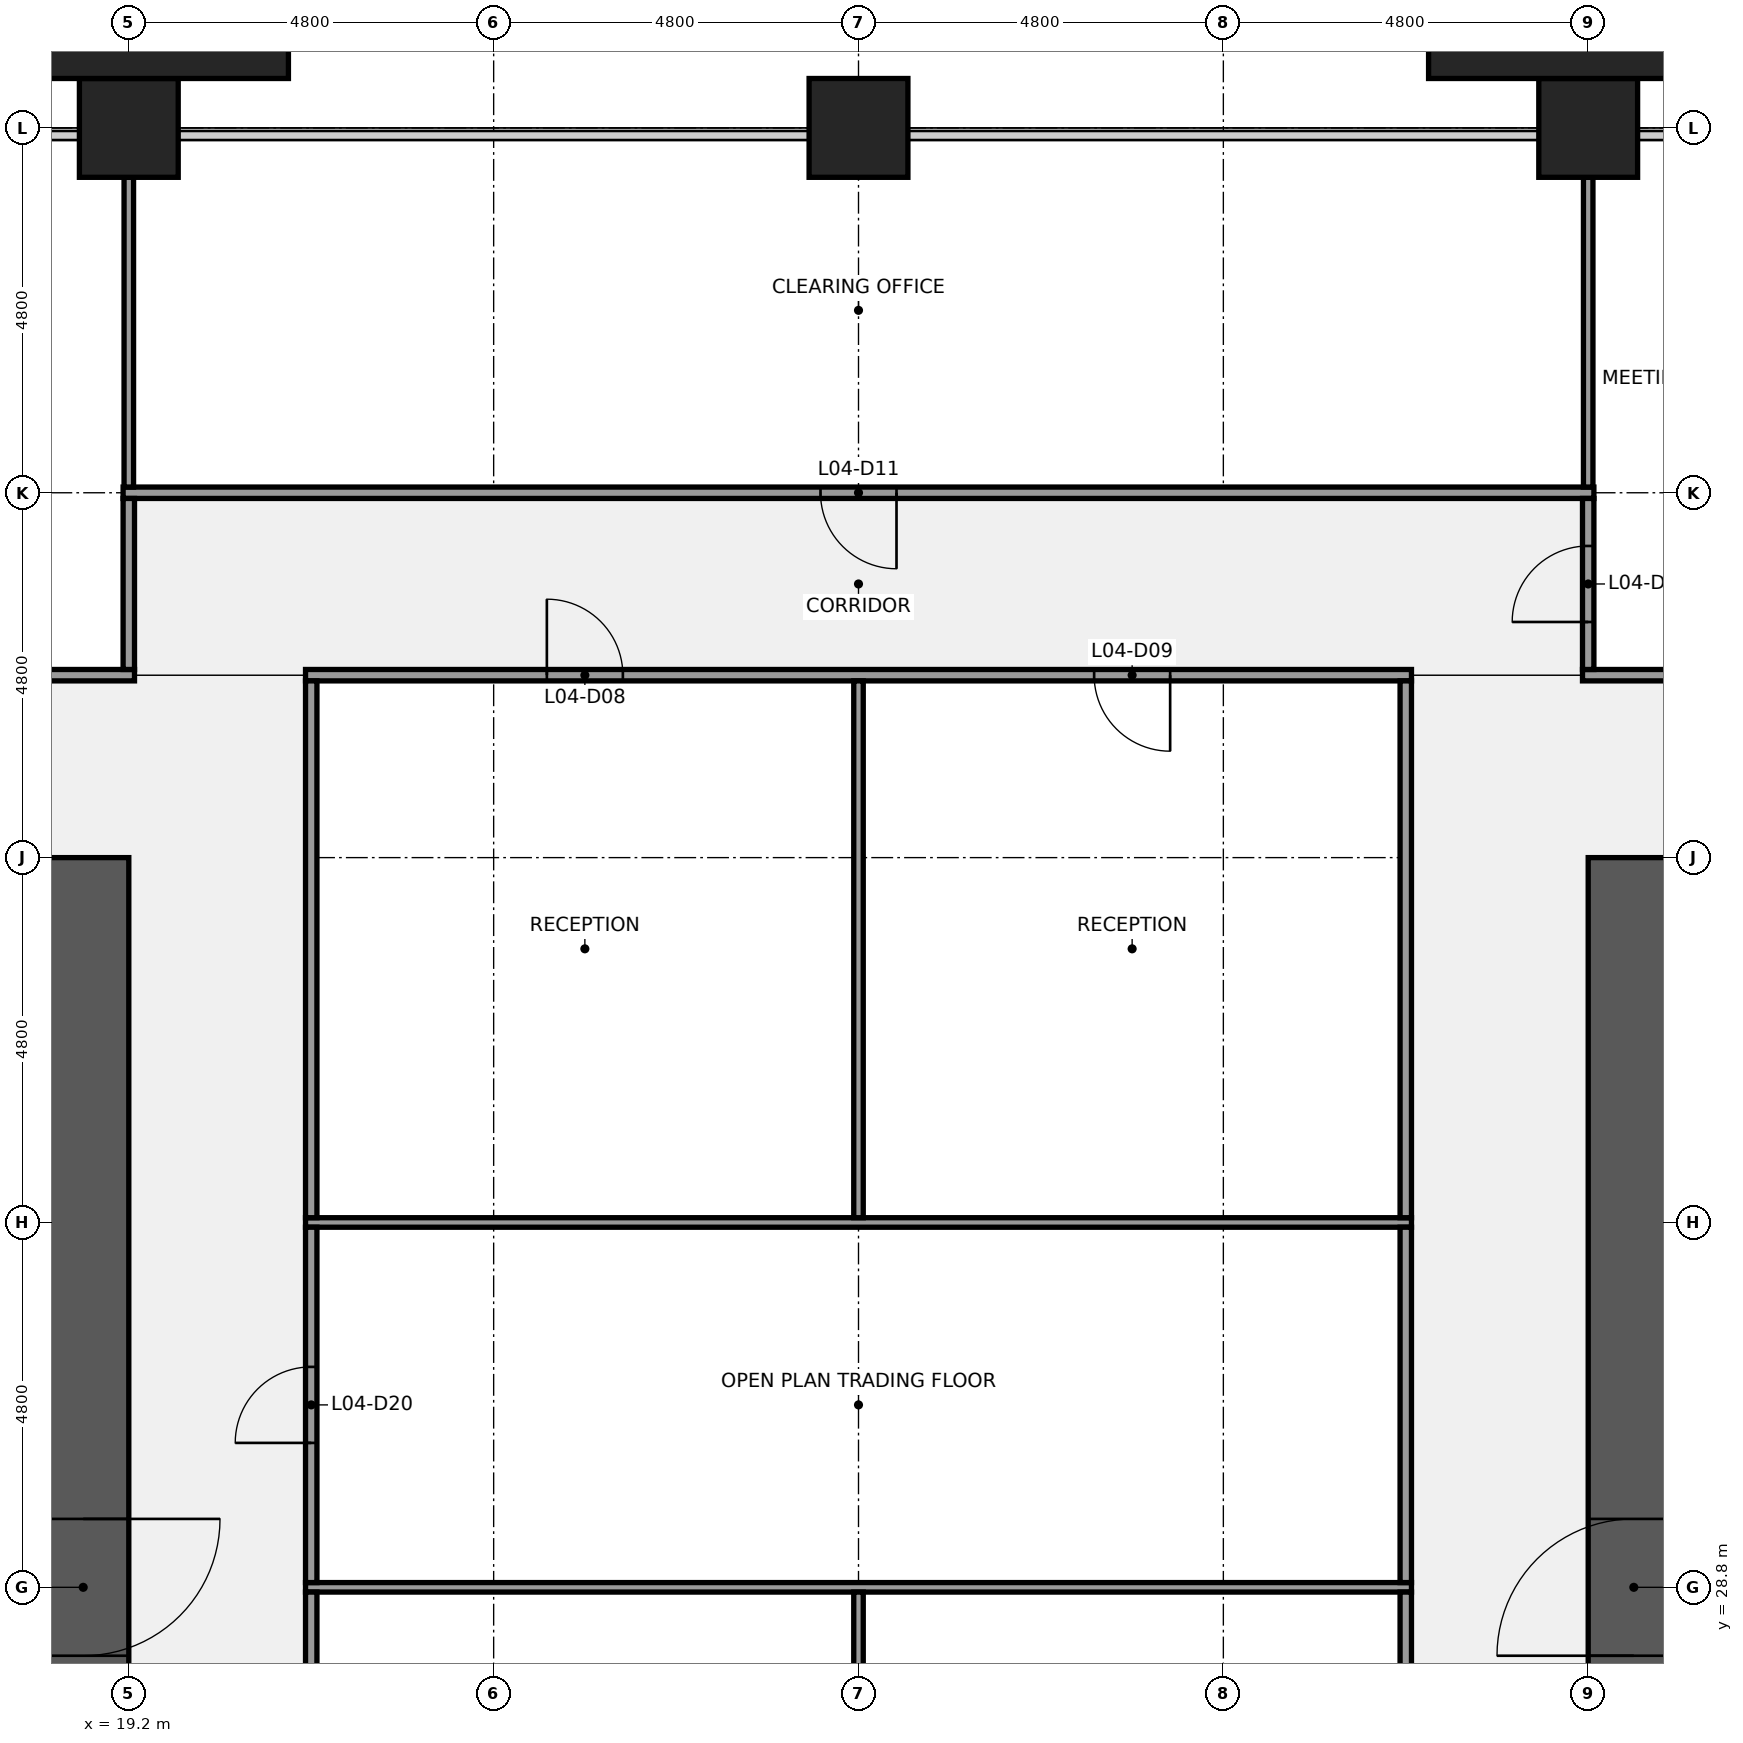
"""IFC4 building model, lengths in metres.
Left out: names, types, materials, properties, quantities, classifications, styles, units other than length and angle.
Written with IfcOpenShell. Run it as: python <this file> out.ifc"""

import sys

from ifc_helpers import new_model, si_unit, direction, frame, frame_2d, origin, origin_2d, place, context, subcontext, project, spatial, rectangle, extrude, element, fill, save


model = new_model("IFC4")
c1 = context("Model", 3, precision=1e-05, world=origin(), true_north=direction((0.0, 1.0)))
c2 = subcontext(c1, "Body", "Model", "MODEL_VIEW")
j1 = project(units=[si_unit("LENGTHUNIT", "METRE"), si_unit("PLANEANGLEUNIT", "RADIAN")], contexts=[c1])
p1 = place(None, origin())
s1 = spatial("IfcSite", under=j1, at=p1, CompositionType="ELEMENT")
p2 = place(p1, origin())
s2 = spatial("IfcBuilding", under=s1, at=p2, CompositionType="ELEMENT")
p3 = place(p2, frame((0.0, 0.0, 25.8)))
s3 = spatial("IfcBuildingStorey", under=s2, at=p3, CompositionType="ELEMENT", Elevation=25.8)
for number, where, z_axis, x_axis in (
    (1, (19.2, 48.0, 0.0), (0.0, 0.0, 1.0), (1.0, 0.0, 0.0)),
    (2, (28.8, 48.0, 0.0), (0.0, 0.0, 1.0), (1.0, 0.0, 0.0)),
    (3, (38.4, 48.0, 0.0), (0.0, 0.0, 1.0), (1.0, 0.0, 0.0)),
):
    element("IfcColumn", number, at=place(p3, frame(where, z_axis=z_axis, x_axis=x_axis)), inside=s3, PredefinedType="COLUMN", context=c2, shape_type="SweptSolid", body=[
        extrude(rectangle(XDim=1.3, YDim=1.3, at=origin_2d()), origin(), (0.0, 0.0, 1.0), 4.4),
    ])
p4 = place(p3, frame((18.6, 38.4, 0.0), z_axis=(0.0, 0.0, 1.0), x_axis=(0.0, -1.0, 0.0)))
e4 = element("IfcWall", 4, at=p4, inside=s3, PredefinedType="SHEAR", context=c2, shape_type="SweptSolid", body=[
    extrude(rectangle(XDim=28.8, YDim=1.2, at=frame_2d((14.4, 0.0))), origin(), (0.0, 0.0, 1.0), 4.24),
])
p5 = place(p4, frame((18.3, 0.0, 0.0)))
e5 = element("IfcOpeningElement", 5, at=p5, cuts=e4, PredefinedType="OPENING", context=c2, shape_type="SweptSolid", body=[
    extrude(rectangle(XDim=1.8, YDim=2.1, at=frame_2d((0.9, 1.05))), frame((0.0, 0.61, 0.0), z_axis=(0.0, -1.0, 0.0), x_axis=(1.0, 0.0, 0.0)), (0.0, 0.0, 1.0), 1.22),
])
p6 = place(p4, frame((8.7, 0.0, 0.0)))
e6 = element("IfcOpeningElement", 6, at=p6, cuts=e4, PredefinedType="OPENING", context=c2, shape_type="SweptSolid", body=[
    extrude(rectangle(XDim=1.8, YDim=2.1, at=frame_2d((0.9, 1.05))), frame((0.0, 0.61, 0.0), z_axis=(0.0, -1.0, 0.0), x_axis=(1.0, 0.0, 0.0)), (0.0, 0.0, 1.0), 1.22),
])
p7 = place(p3, frame((39.0, 9.6, 0.0), z_axis=(0.0, 0.0, 1.0), x_axis=(0.0, 1.0, 0.0)))
e7 = element("IfcWall", 7, at=p7, inside=s3, PredefinedType="SHEAR", context=c2, shape_type="SweptSolid", body=[
    extrude(rectangle(XDim=28.8, YDim=1.2, at=frame_2d((14.4, 0.0))), origin(), (0.0, 0.0, 1.0), 4.24),
])
p8 = place(p7, frame((8.7, 0.0, 0.0)))
e8 = element("IfcOpeningElement", 8, at=p8, cuts=e7, PredefinedType="OPENING", context=c2, shape_type="SweptSolid", body=[
    extrude(rectangle(XDim=1.8, YDim=2.1, at=frame_2d((0.9, 1.05))), frame((0.0, 0.61, 0.0), z_axis=(0.0, -1.0, 0.0), x_axis=(1.0, 0.0, 0.0)), (0.0, 0.0, 1.0), 1.22),
])
p9 = place(p7, frame((18.3, 0.0, 0.0)))
e9 = element("IfcOpeningElement", 9, at=p9, cuts=e7, PredefinedType="OPENING", context=c2, shape_type="SweptSolid", body=[
    extrude(rectangle(XDim=1.8, YDim=2.1, at=frame_2d((0.9, 1.05))), frame((0.0, 0.61, 0.0), z_axis=(0.0, -1.0, 0.0), x_axis=(1.0, 0.0, 0.0)), (0.0, 0.0, 1.0), 1.22),
])
for number, where, z_axis, x_axis in (
    (10, (21.525, 28.8, 0.0), (0.0, 0.0, 1.0), (1.0, 0.0, 0.0)),
    (11, (21.525, 33.6, 0.0), (0.0, 0.0, 1.0), (1.0, 0.0, 0.0)),
):
    element("IfcWall", number, at=place(p3, frame(where, z_axis=z_axis, x_axis=x_axis)), inside=s3, PredefinedType="PARTITIONING", context=c2, shape_type="SweptSolid", body=[
        extrude(rectangle(XDim=14.55, YDim=0.125, at=frame_2d((7.275, 0.0))), origin(), (0.0, 0.0, 1.0), 3.27),
    ])
p10 = place(p3, frame((14.325, 40.8, 0.0), z_axis=(0.0, 0.0, 1.0), x_axis=(1.0, 0.0, 0.0)))
e12 = element("IfcWall", 12, at=p10, inside=s3, PredefinedType="PARTITIONING", context=c2, shape_type="SweptSolid", body=[
    extrude(rectangle(XDim=4.95, YDim=0.15, at=frame_2d((2.475, 0.0))), origin(), (0.0, 0.0, 1.0), 3.27),
])
p11 = place(p10, frame((1.975, 0.0, 0.0)))
e13 = element("IfcOpeningElement", 13, at=p11, cuts=e12, PredefinedType="OPENING", context=c2, shape_type="SweptSolid", body=[
    extrude(rectangle(XDim=1.0, YDim=2.1, at=frame_2d((0.5, 1.05))), frame((0.0, 0.085, 0.0), z_axis=(0.0, -1.0, 0.0), x_axis=(1.0, 0.0, 0.0)), (0.0, 0.0, 1.0), 0.17),
])
p12 = place(p3, frame((21.525, 40.8, 0.0), z_axis=(0.0, 0.0, 1.0), x_axis=(1.0, 0.0, 0.0)))
e14 = element("IfcWall", 14, at=p12, inside=s3, PredefinedType="PARTITIONING", context=c2, shape_type="SweptSolid", body=[
    extrude(rectangle(XDim=14.55, YDim=0.15, at=frame_2d((7.275, 0.0))), origin(), (0.0, 0.0, 1.0), 3.27),
])
p13 = place(p12, frame((3.175, 0.0, 0.0)))
e15 = element("IfcOpeningElement", 15, at=p13, cuts=e14, PredefinedType="OPENING", context=c2, shape_type="SweptSolid", body=[
    extrude(rectangle(XDim=1.0, YDim=2.1, at=frame_2d((0.5, 1.05))), frame((0.0, 0.085, 0.0), z_axis=(0.0, -1.0, 0.0), x_axis=(1.0, 0.0, 0.0)), (0.0, 0.0, 1.0), 0.17),
])
p14 = place(p12, frame((10.375, 0.0, 0.0)))
e16 = element("IfcOpeningElement", 16, at=p14, cuts=e14, PredefinedType="OPENING", context=c2, shape_type="SweptSolid", body=[
    extrude(rectangle(XDim=1.0, YDim=2.1, at=frame_2d((0.5, 1.05))), frame((0.0, 0.085, 0.0), z_axis=(0.0, -1.0, 0.0), x_axis=(1.0, 0.0, 0.0)), (0.0, 0.0, 1.0), 0.17),
])
p15 = place(p3, frame((38.325, 40.8, 0.0), z_axis=(0.0, 0.0, 1.0), x_axis=(1.0, 0.0, 0.0)))
e17 = element("IfcWall", 17, at=p15, inside=s3, PredefinedType="PARTITIONING", context=c2, shape_type="SweptSolid", body=[
    extrude(rectangle(XDim=9.75, YDim=0.15, at=frame_2d((4.875, 0.0))), origin(), (0.0, 0.0, 1.0), 3.27),
])
p16 = place(p15, frame((3.175, 0.0, 0.0)))
e18 = element("IfcOpeningElement", 18, at=p16, cuts=e17, PredefinedType="OPENING", context=c2, shape_type="SweptSolid", body=[
    extrude(rectangle(XDim=1.0, YDim=2.1, at=frame_2d((0.5, 1.05))), frame((0.0, 0.085, 0.0), z_axis=(0.0, -1.0, 0.0), x_axis=(1.0, 0.0, 0.0)), (0.0, 0.0, 1.0), 0.17),
])
p17 = place(p3, frame((19.125, 43.2, 0.0), z_axis=(0.0, 0.0, 1.0), x_axis=(1.0, 0.0, 0.0)))
e19 = element("IfcWall", 19, at=p17, inside=s3, PredefinedType="PARTITIONING", context=c2, shape_type="SweptSolid", body=[
    extrude(rectangle(XDim=19.35, YDim=0.15, at=frame_2d((9.675, 0.0))), origin(), (0.0, 0.0, 1.0), 3.27),
])
p18 = place(p17, frame((9.175, 0.0, 0.0)))
e20 = element("IfcOpeningElement", 20, at=p18, cuts=e19, PredefinedType="OPENING", context=c2, shape_type="SweptSolid", body=[
    extrude(rectangle(XDim=1.0, YDim=2.1, at=frame_2d((0.5, 1.05))), frame((0.0, 0.085, 0.0), z_axis=(0.0, -1.0, 0.0), x_axis=(1.0, 0.0, 0.0)), (0.0, 0.0, 1.0), 0.17),
])
p19 = place(p3, frame((19.2, 43.275, 0.0), z_axis=(0.0, 0.0, 1.0), x_axis=(0.0, 1.0, 0.0)))
e21 = element("IfcWall", 21, at=p19, inside=s3, PredefinedType="PARTITIONING", context=c2, shape_type="SweptSolid", body=[
    extrude(rectangle(XDim=4.075, YDim=0.125, at=frame_2d((2.038, 0.0))), origin(), (0.0, 0.0, 1.0), 3.27),
])
p20 = place(p3, frame((19.2, 40.875, 0.0), z_axis=(0.0, 0.0, 1.0), x_axis=(0.0, 1.0, 0.0)))
e22 = element("IfcWall", 22, at=p20, inside=s3, PredefinedType="PARTITIONING", context=c2, shape_type="SweptSolid", body=[
    extrude(rectangle(XDim=2.25, YDim=0.15, at=frame_2d((1.125, 0.0))), origin(), (0.0, 0.0, 1.0), 3.27),
])
p21 = place(p3, frame((21.6, 21.663, 0.0), z_axis=(0.0, 0.0, 1.0), x_axis=(0.0, 1.0, 0.0)))
e23 = element("IfcWall", 23, at=p21, inside=s3, PredefinedType="PARTITIONING", context=c2, shape_type="SweptSolid", body=[
    extrude(rectangle(XDim=7.075, YDim=0.15, at=frame_2d((3.538, 0.0))), origin(), (0.0, 0.0, 1.0), 3.27),
])
p22 = place(p21, frame((3.038, 0.0, 0.0)))
e24 = element("IfcOpeningElement", 24, at=p22, cuts=e23, PredefinedType="OPENING", context=c2, shape_type="SweptSolid", body=[
    extrude(rectangle(XDim=1.0, YDim=2.1, at=frame_2d((0.5, 1.05))), frame((0.0, 0.085, 0.0), z_axis=(0.0, -1.0, 0.0), x_axis=(1.0, 0.0, 0.0)), (0.0, 0.0, 1.0), 0.17),
])
p23 = place(p3, frame((21.6, 28.863, 0.0), z_axis=(0.0, 0.0, 1.0), x_axis=(0.0, 1.0, 0.0)))
e25 = element("IfcWall", 25, at=p23, inside=s3, PredefinedType="PARTITIONING", context=c2, shape_type="SweptSolid", body=[
    extrude(rectangle(XDim=4.675, YDim=0.15, at=frame_2d((2.337, 0.0))), origin(), (0.0, 0.0, 1.0), 3.27),
])
p24 = place(p23, frame((1.837, 0.0, 0.0)))
e26 = element("IfcOpeningElement", 26, at=p24, cuts=e25, PredefinedType="OPENING", context=c2, shape_type="SweptSolid", body=[
    extrude(rectangle(XDim=1.0, YDim=2.1, at=frame_2d((0.5, 1.05))), frame((0.0, 0.085, 0.0), z_axis=(0.0, -1.0, 0.0), x_axis=(1.0, 0.0, 0.0)), (0.0, 0.0, 1.0), 0.17),
])
p25 = place(p3, frame((21.6, 33.663, 0.0), z_axis=(0.0, 0.0, 1.0), x_axis=(0.0, 1.0, 0.0)))
e27 = element("IfcWall", 27, at=p25, inside=s3, PredefinedType="PARTITIONING", context=c2, shape_type="SweptSolid", body=[
    extrude(rectangle(XDim=7.062, YDim=0.15, at=frame_2d((3.531, 0.0))), origin(), (0.0, 0.0, 1.0), 3.27),
])
p26 = place(p3, frame((28.8, 21.663, 0.0), z_axis=(0.0, 0.0, 1.0), x_axis=(0.0, 1.0, 0.0)))
e28 = element("IfcWall", 28, at=p26, inside=s3, PredefinedType="PARTITIONING", context=c2, shape_type="SweptSolid", body=[
    extrude(rectangle(XDim=7.075, YDim=0.125, at=frame_2d((3.538, 0.0))), origin(), (0.0, 0.0, 1.0), 3.27),
])
p27 = place(p3, frame((28.8, 33.663, 0.0), z_axis=(0.0, 0.0, 1.0), x_axis=(0.0, 1.0, 0.0)))
e29 = element("IfcWall", 29, at=p27, inside=s3, PredefinedType="PARTITIONING", context=c2, shape_type="SweptSolid", body=[
    extrude(rectangle(XDim=7.062, YDim=0.125, at=frame_2d((3.531, 0.0))), origin(), (0.0, 0.0, 1.0), 3.27),
])
p28 = place(p3, frame((36.0, 21.663, 0.0), z_axis=(0.0, 0.0, 1.0), x_axis=(0.0, 1.0, 0.0)))
e30 = element("IfcWall", 30, at=p28, inside=s3, PredefinedType="PARTITIONING", context=c2, shape_type="SweptSolid", body=[
    extrude(rectangle(XDim=7.075, YDim=0.15, at=frame_2d((3.538, 0.0))), origin(), (0.0, 0.0, 1.0), 3.27),
])
p29 = place(p28, frame((3.038, 0.0, 0.0)))
e31 = element("IfcOpeningElement", 31, at=p29, cuts=e30, PredefinedType="OPENING", context=c2, shape_type="SweptSolid", body=[
    extrude(rectangle(XDim=1.0, YDim=2.1, at=frame_2d((0.5, 1.05))), frame((0.0, 0.085, 0.0), z_axis=(0.0, -1.0, 0.0), x_axis=(1.0, 0.0, 0.0)), (0.0, 0.0, 1.0), 0.17),
])
p30 = place(p3, frame((36.0, 28.863, 0.0), z_axis=(0.0, 0.0, 1.0), x_axis=(0.0, 1.0, 0.0)))
e32 = element("IfcWall", 32, at=p30, inside=s3, PredefinedType="PARTITIONING", context=c2, shape_type="SweptSolid", body=[
    extrude(rectangle(XDim=4.675, YDim=0.15, at=frame_2d((2.337, 0.0))), origin(), (0.0, 0.0, 1.0), 3.27),
])
p31 = place(p3, frame((36.0, 33.663, 0.0), z_axis=(0.0, 0.0, 1.0), x_axis=(0.0, 1.0, 0.0)))
e33 = element("IfcWall", 33, at=p31, inside=s3, PredefinedType="PARTITIONING", context=c2, shape_type="SweptSolid", body=[
    extrude(rectangle(XDim=7.062, YDim=0.15, at=frame_2d((3.531, 0.0))), origin(), (0.0, 0.0, 1.0), 3.27),
])
p32 = place(p3, frame((38.4, 43.275, 0.0), z_axis=(0.0, 0.0, 1.0), x_axis=(0.0, 1.0, 0.0)))
e34 = element("IfcWall", 34, at=p32, inside=s3, PredefinedType="PARTITIONING", context=c2, shape_type="SweptSolid", body=[
    extrude(rectangle(XDim=4.075, YDim=0.125, at=frame_2d((2.038, 0.0))), origin(), (0.0, 0.0, 1.0), 3.27),
])
p33 = place(p3, frame((38.4, 40.875, 0.0), z_axis=(0.0, 0.0, 1.0), x_axis=(0.0, 1.0, 0.0)))
e35 = element("IfcWall", 35, at=p33, inside=s3, PredefinedType="PARTITIONING", context=c2, shape_type="SweptSolid", body=[
    extrude(rectangle(XDim=2.25, YDim=0.15, at=frame_2d((1.125, 0.0))), origin(), (0.0, 0.0, 1.0), 3.27),
])
p34 = place(p33, frame((0.625, 0.0, 0.0)))
e36 = element("IfcOpeningElement", 36, at=p34, cuts=e35, PredefinedType="OPENING", context=c2, shape_type="SweptSolid", body=[
    extrude(rectangle(XDim=1.0, YDim=2.1, at=frame_2d((0.5, 1.05))), frame((0.0, 0.085, 0.0), z_axis=(0.0, -1.0, 0.0), x_axis=(1.0, 0.0, 0.0)), (0.0, 0.0, 1.0), 0.17),
])
for number, where, z_axis, x_axis in (
    (37, (19.2, 49.075, 0.0), (0.0, 0.0, 1.0), (1.0, 0.0, 0.0)),
    (38, (38.4, 49.075, 0.0), (0.0, 0.0, 1.0), (1.0, 0.0, 0.0)),
):
    element("IfcColumn", number, at=place(p3, frame(where, z_axis=z_axis, x_axis=x_axis)), inside=s3, PredefinedType="PILASTER", context=c2, shape_type="SweptSolid", body=[
        extrude(rectangle(XDim=4.2, YDim=0.85, at=origin_2d()), origin(), (0.0, 0.0, 1.0), 4.4),
    ])
p35 = place(p6, origin())
e39 = element("IfcDoor", 39, at=p35, inside=s3, OperationType="DOUBLE_DOOR_SINGLE_SWING", PredefinedType="DOOR", context=c2, shape_type="SweptSolid", body=[
    extrude(rectangle(XDim=1.8, YDim=2.1, at=frame_2d((0.9, 1.05))), frame((0.0, 0.025, 0.0), z_axis=(0.0, -1.0, 0.0), x_axis=(1.0, 0.0, 0.0)), (0.0, 0.0, 1.0), 0.05),
])
fill(e6, e39)
p36 = place(p9, origin())
e40 = element("IfcDoor", 40, at=p36, inside=s3, OperationType="DOUBLE_DOOR_SINGLE_SWING", PredefinedType="DOOR", context=c2, shape_type="SweptSolid", body=[
    extrude(rectangle(XDim=1.8, YDim=2.1, at=frame_2d((0.9, 1.05))), frame((0.0, 0.025, 0.0), z_axis=(0.0, -1.0, 0.0), x_axis=(1.0, 0.0, 0.0)), (0.0, 0.0, 1.0), 0.05),
])
fill(e9, e40)
p37 = place(p13, origin())
e41 = element("IfcDoor", 41, at=p37, inside=s3, OperationType="SINGLE_SWING_LEFT", PredefinedType="DOOR", context=c2, shape_type="SweptSolid", body=[
    extrude(rectangle(XDim=1.0, YDim=2.1, at=frame_2d((0.5, 1.05))), frame((0.0, 0.025, 0.0), z_axis=(0.0, -1.0, 0.0), x_axis=(1.0, 0.0, 0.0)), (0.0, 0.0, 1.0), 0.05),
])
fill(e15, e41)
p38 = place(p14, origin())
e42 = element("IfcDoor", 42, at=p38, inside=s3, OperationType="SINGLE_SWING_RIGHT", PredefinedType="DOOR", context=c2, shape_type="SweptSolid", body=[
    extrude(rectangle(XDim=1.0, YDim=2.1, at=frame_2d((0.5, 1.05))), frame((0.0, 0.025, 0.0), z_axis=(0.0, -1.0, 0.0), x_axis=(1.0, 0.0, 0.0)), (0.0, 0.0, 1.0), 0.05),
])
fill(e16, e42)
p39 = place(p18, origin())
e43 = element("IfcDoor", 43, at=p39, inside=s3, OperationType="SINGLE_SWING_RIGHT", PredefinedType="DOOR", context=c2, shape_type="SweptSolid", body=[
    extrude(rectangle(XDim=1.0, YDim=2.1, at=frame_2d((0.5, 1.05))), frame((0.0, 0.025, 0.0), z_axis=(0.0, -1.0, 0.0), x_axis=(1.0, 0.0, 0.0)), (0.0, 0.0, 1.0), 0.05),
])
fill(e20, e43)
p40 = place(p24, origin())
e44 = element("IfcDoor", 44, at=p40, inside=s3, OperationType="SINGLE_SWING_LEFT", PredefinedType="DOOR", context=c2, shape_type="SweptSolid", body=[
    extrude(rectangle(XDim=1.0, YDim=2.1, at=frame_2d((0.5, 1.05))), frame((0.0, 0.025, 0.0), z_axis=(0.0, -1.0, 0.0), x_axis=(1.0, 0.0, 0.0)), (0.0, 0.0, 1.0), 0.05),
])
fill(e26, e44)
p41 = place(p34, origin())
e45 = element("IfcDoor", 45, at=p41, inside=s3, OperationType="SINGLE_SWING_LEFT", PredefinedType="DOOR", context=c2, shape_type="SweptSolid", body=[
    extrude(rectangle(XDim=1.0, YDim=2.1, at=frame_2d((0.5, 1.05))), frame((0.0, 0.025, 0.0), z_axis=(0.0, -1.0, 0.0), x_axis=(1.0, 0.0, 0.0)), (0.0, 0.0, 1.0), 0.05),
])
fill(e36, e45)
save(model, sys.argv[1])
